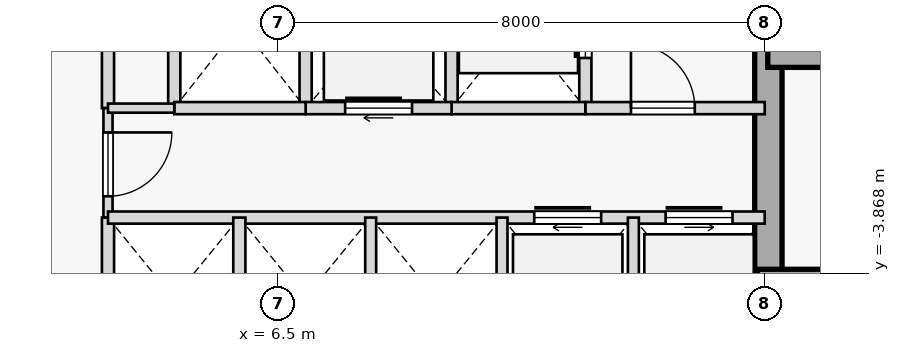
"""IFC4 building model, lengths in metres.
Left out: names, types, materials, properties, quantities, classifications, styles, units other than length and angle.
Written with IfcOpenShell. Run it as: python <this file> out.ifc"""

import sys

from ifc_helpers import new_model, si_unit, direction, frame, frame_2d, origin, origin_2d, place, context, subcontext, project, spatial, rectangle, extrude, element, fill, save


model = new_model("IFC4")
c1 = context("Model", 3, precision=1e-05, world=origin(), true_north=direction((0.0, 1.0)))
c2 = subcontext(c1, "Body", "Model", "MODEL_VIEW")
j1 = project(units=[si_unit("LENGTHUNIT", "METRE"), si_unit("PLANEANGLEUNIT", "RADIAN")], contexts=[c1])
p1 = place(None, origin())
s1 = spatial("IfcSite", under=j1, at=p1, CompositionType="ELEMENT")
p2 = place(p1, origin())
s2 = spatial("IfcBuilding", under=s1, at=p2, CompositionType="ELEMENT")
p3 = place(p2, frame((0.0, 0.0, 29.4)))
s3 = spatial("IfcBuildingStorey", under=s2, at=p3, CompositionType="ELEMENT", Elevation=29.4)
for number, where, z_axis, x_axis in (
    (1, (15.25, 0.22, 0.0), (0.0, 0.0, 1.0), (1.0, 0.0, 0.0)),
    (2, (15.08, -4.5, 0.0), (0.0, 0.0, 1.0), (1.0, 0.0, 0.0)),
):
    element("IfcColumn", number, at=place(p3, frame(where, z_axis=z_axis, x_axis=x_axis)), inside=s3, PredefinedType="COLUMN", context=c2, shape_type="SweptSolid", body=[
        extrude(rectangle(XDim=1.4, YDim=1.4, at=origin_2d()), origin(), (0.0, 0.0, 1.0), 3.8),
    ])
p4 = place(p3, frame((14.56, -5.375, 0.0), z_axis=(0.0, 0.0, 1.0), x_axis=(0.0, 1.0, 0.0)))
e3 = element("IfcWall", 3, at=p4, inside=s3, PredefinedType="SHEAR", context=c2, shape_type="SweptSolid", body=[
    extrude(rectangle(XDim=10.75, YDim=0.45, at=frame_2d((5.375, 0.0))), origin(), (0.0, 0.0, 1.0), 3.575),
])
p5 = place(p3, frame((3.7, -1.15, 0.0), z_axis=(0.0, 0.0, 1.0), x_axis=(0.0, 1.0, 0.0)))
e4 = element("IfcWall", 4, at=p5, inside=s3, PredefinedType="STANDARD", context=c2, shape_type="SweptSolid", body=[
    extrude(rectangle(XDim=6.75, YDim=0.2, at=frame_2d((3.375, 0.0))), origin(), (0.0, 0.0, 1.0), 3.575),
])
p6 = place(p5, frame((3.6, 0.0, 0.0)))
e5 = element("IfcOpeningElement", 5, at=p6, cuts=e4, PredefinedType="OPENING", context=c2, shape_type="SweptSolid", body=[
    extrude(rectangle(XDim=0.92, YDim=2.15, at=frame_2d((0.46, 1.075))), frame((0.0, 0.11, 0.0), z_axis=(0.0, -1.0, 0.0), x_axis=(1.0, 0.0, 0.0)), (0.0, 0.0, 1.0), 0.22),
])
p7 = place(p3, frame((3.7, -2.95, 0.0), z_axis=(0.0, 0.0, 1.0), x_axis=(0.0, 1.0, 0.0)))
e6 = element("IfcWall", 6, at=p7, inside=s3, PredefinedType="PARTITIONING", context=c2, shape_type="SweptSolid", body=[
    extrude(rectangle(XDim=1.8, YDim=0.15, at=frame_2d((0.9, 0.0))), origin(), (0.0, 0.0, 1.0), 3.575),
])
p8 = place(p7, frame((0.35, 0.0, 0.0)))
e7 = element("IfcOpeningElement", 7, at=p8, cuts=e6, PredefinedType="OPENING", context=c2, shape_type="SweptSolid", body=[
    extrude(rectangle(XDim=1.05, YDim=2.18, at=frame_2d((0.525, 1.09))), frame((0.0, 0.085, 0.0), z_axis=(0.0, -1.0, 0.0), x_axis=(1.0, 0.0, 0.0)), (0.0, 0.0, 1.0), 0.17),
])
p9 = place(p3, frame((3.7, -5.6, 0.0), z_axis=(0.0, 0.0, 1.0), x_axis=(0.0, 1.0, 0.0)))
e8 = element("IfcWall", 8, at=p9, inside=s3, PredefinedType="STANDARD", context=c2, shape_type="SweptSolid", body=[
    extrude(rectangle(XDim=2.65, YDim=0.2, at=frame_2d((1.325, 0.0))), origin(), (0.0, 0.0, 1.0), 3.575),
])
p10 = place(p3, frame((11.55, -1.15, 0.0), z_axis=(0.0, 0.0, 1.0), x_axis=(0.0, 1.0, 0.0)))
e9 = element("IfcWall", 9, at=p10, inside=s3, PredefinedType="STANDARD", context=c2, shape_type="SweptSolid", body=[
    extrude(rectangle(XDim=2.75, YDim=0.2, at=frame_2d((1.375, 0.0))), origin(), (0.0, 0.0, 1.0), 3.575),
])
p11 = place(p10, frame((0.825, 0.0, 0.0)))
e10 = element("IfcOpeningElement", 10, at=p11, cuts=e9, PredefinedType="OPENING", context=c2, shape_type="SweptSolid", body=[
    extrude(rectangle(XDim=1.1, YDim=2.15, at=frame_2d((0.55, 1.075))), frame((0.0, 0.11, 0.0), z_axis=(0.0, -1.0, 0.0), x_axis=(1.0, 0.0, 0.0)), (0.0, 0.0, 1.0), 0.22),
])
p12 = place(p3, frame((9.35, -1.15, 0.0), z_axis=(0.0, 0.0, 1.0), x_axis=(0.0, 1.0, 0.0)))
e11 = element("IfcWall", 11, at=p12, inside=s3, PredefinedType="STANDARD", context=c2, shape_type="SweptSolid", body=[
    extrude(rectangle(XDim=2.75, YDim=0.2, at=frame_2d((1.375, 0.0))), origin(), (0.0, 0.0, 1.0), 3.575),
])
p13 = place(p3, frame((11.55, -1.15, 0.0), z_axis=(0.0, 0.0, 1.0), x_axis=(1.0, 0.0, 0.0)))
e12 = element("IfcWall", 12, at=p13, inside=s3, PredefinedType="STANDARD", context=c2, shape_type="SweptSolid", body=[
    extrude(rectangle(XDim=2.95, YDim=0.2, at=frame_2d((1.475, 0.0))), origin(), (0.0, 0.0, 1.0), 3.575),
])
p14 = place(p13, frame((0.75, 0.0, 0.0)))
e13 = element("IfcOpeningElement", 13, at=p14, cuts=e12, PredefinedType="OPENING", context=c2, shape_type="SweptSolid", body=[
    extrude(rectangle(XDim=1.05, YDim=2.18, at=frame_2d((0.525, 1.09))), frame((0.0, 0.11, 0.0), z_axis=(0.0, -1.0, 0.0), x_axis=(1.0, 0.0, 0.0)), (0.0, 0.0, 1.0), 0.22),
])
p15 = place(p3, frame((9.35, -1.15, 0.0), z_axis=(0.0, 0.0, 1.0), x_axis=(1.0, 0.0, 0.0)))
e14 = element("IfcWall", 14, at=p15, inside=s3, PredefinedType="STANDARD", context=c2, shape_type="SweptSolid", body=[
    extrude(rectangle(XDim=2.2, YDim=0.2, at=frame_2d((1.1, 0.0))), origin(), (0.0, 0.0, 1.0), 3.575),
])
p16 = place(p3, frame((6.95, -1.15, 0.0), z_axis=(0.0, 0.0, 1.0), x_axis=(0.0, 1.0, 0.0)))
e15 = element("IfcWall", 15, at=p16, inside=s3, PredefinedType="STANDARD", context=c2, shape_type="SweptSolid", body=[
    extrude(rectangle(XDim=2.75, YDim=0.2, at=frame_2d((1.375, 0.0))), origin(), (0.0, 0.0, 1.0), 3.575),
])
p17 = place(p3, frame((6.95, -1.15, 0.0), z_axis=(0.0, 0.0, 1.0), x_axis=(1.0, 0.0, 0.0)))
e16 = element("IfcWall", 16, at=p17, inside=s3, PredefinedType="STANDARD", context=c2, shape_type="SweptSolid", body=[
    extrude(rectangle(XDim=2.4, YDim=0.2, at=frame_2d((1.2, 0.0))), origin(), (0.0, 0.0, 1.0), 3.575),
])
p18 = place(p17, frame((0.65, 0.0, 0.0)))
e17 = element("IfcOpeningElement", 17, at=p18, cuts=e16, PredefinedType="OPENING", context=c2, shape_type="SweptSolid", body=[
    extrude(rectangle(XDim=1.1, YDim=2.15, at=frame_2d((0.55, 1.075))), frame((0.0, 0.11, 0.0), z_axis=(0.0, -1.0, 0.0), x_axis=(1.0, 0.0, 0.0)), (0.0, 0.0, 1.0), 0.22),
])
p19 = place(p3, frame((4.79, -1.15, 0.0), z_axis=(0.0, 0.0, 1.0), x_axis=(0.0, 1.0, 0.0)))
e18 = element("IfcWall", 18, at=p19, inside=s3, PredefinedType="STANDARD", context=c2, shape_type="SweptSolid", body=[
    extrude(rectangle(XDim=2.75, YDim=0.2, at=frame_2d((1.375, 0.0))), origin(), (0.0, 0.0, 1.0), 3.575),
])
p20 = place(p3, frame((4.79, -1.15, 0.0), z_axis=(0.0, 0.0, 1.0), x_axis=(1.0, 0.0, 0.0)))
e19 = element("IfcWall", 19, at=p20, inside=s3, PredefinedType="STANDARD", context=c2, shape_type="SweptSolid", body=[
    extrude(rectangle(XDim=2.16, YDim=0.2, at=frame_2d((1.08, 0.0))), origin(), (0.0, 0.0, 1.0), 3.575),
])
p21 = place(p3, frame((3.7, -1.15, 0.0), z_axis=(0.0, 0.0, 1.0), x_axis=(1.0, 0.0, 0.0)))
e20 = element("IfcWall", 20, at=p21, inside=s3, PredefinedType="PARTITIONING", context=c2, shape_type="SweptSolid", body=[
    extrude(rectangle(XDim=1.09, YDim=0.15, at=frame_2d((0.545, 0.0))), origin(), (0.0, 0.0, 1.0), 3.575),
])
p22 = place(p3, frame((3.7, -2.95, 0.0), z_axis=(0.0, 0.0, 1.0), x_axis=(1.0, 0.0, 0.0)))
e21 = element("IfcWall", 21, at=p22, inside=s3, PredefinedType="STANDARD", context=c2, shape_type="SweptSolid", body=[
    extrude(rectangle(XDim=10.8, YDim=0.2, at=frame_2d((5.4, 0.0))), origin(), (0.0, 0.0, 1.0), 3.575),
])
p23 = place(p22, frame((7.01, 0.0, 0.0)))
e22 = element("IfcOpeningElement", 22, at=p23, cuts=e21, PredefinedType="OPENING", context=c2, shape_type="SweptSolid", body=[
    extrude(rectangle(XDim=1.1, YDim=2.15, at=frame_2d((0.55, 1.075))), frame((0.0, 0.11, 0.0), z_axis=(0.0, -1.0, 0.0), x_axis=(1.0, 0.0, 0.0)), (0.0, 0.0, 1.0), 0.22),
])
p24 = place(p22, frame((9.17, 0.0, 0.0)))
e23 = element("IfcOpeningElement", 23, at=p24, cuts=e21, PredefinedType="OPENING", context=c2, shape_type="SweptSolid", body=[
    extrude(rectangle(XDim=1.1, YDim=2.15, at=frame_2d((0.55, 1.075))), frame((0.0, 0.11, 0.0), z_axis=(0.0, -1.0, 0.0), x_axis=(1.0, 0.0, 0.0)), (0.0, 0.0, 1.0), 0.22),
])
p25 = place(p3, frame((5.86, -5.6, 0.0), z_axis=(0.0, 0.0, 1.0), x_axis=(0.0, 1.0, 0.0)))
e24 = element("IfcWall", 24, at=p25, inside=s3, PredefinedType="STANDARD", context=c2, shape_type="SweptSolid", body=[
    extrude(rectangle(XDim=2.65, YDim=0.2, at=frame_2d((1.325, 0.0))), origin(), (0.0, 0.0, 1.0), 3.575),
])
for number, where, z_axis, x_axis in (
    (25, (12.34, -5.6, 0.0), (0.0, 0.0, 1.0), (0.0, 1.0, 0.0)),
    (26, (10.18, -5.6, 0.0), (0.0, 0.0, 1.0), (0.0, 1.0, 0.0)),
    (27, (8.02, -5.6, 0.0), (0.0, 0.0, 1.0), (0.0, 1.0, 0.0)),
):
    element("IfcWall", number, at=place(p3, frame(where, z_axis=z_axis, x_axis=x_axis)), inside=s3, PredefinedType="STANDARD", context=c2, shape_type="SweptSolid", body=[
        extrude(rectangle(XDim=2.65, YDim=0.18, at=frame_2d((1.325, 0.0))), origin(), (0.0, 0.0, 1.0), 3.575),
    ])
p26 = place(p14, origin())
e28 = element("IfcDoor", 28, at=p26, inside=s3, OperationType="SINGLE_SWING_LEFT", PredefinedType="DOOR", context=c2, shape_type="SweptSolid", body=[
    extrude(rectangle(XDim=1.05, YDim=2.18, at=frame_2d((0.525, 1.09))), frame((0.0, 0.025, 0.0), z_axis=(0.0, -1.0, 0.0), x_axis=(1.0, 0.0, 0.0)), (0.0, 0.0, 1.0), 0.05),
])
fill(e13, e28)
p27 = place(p8, frame((1.05, 0.0, 0.0), z_axis=(0.0, 0.0, 1.0), x_axis=(-1.0, 0.0, 0.0)))
e29 = element("IfcDoor", 29, at=p27, inside=s3, OperationType="SINGLE_SWING_RIGHT", PredefinedType="DOOR", context=c2, shape_type="SweptSolid", body=[
    extrude(rectangle(XDim=1.05, YDim=2.18, at=frame_2d((0.525, 1.09))), frame((0.0, 0.025, 0.0), z_axis=(0.0, -1.0, 0.0), x_axis=(1.0, 0.0, 0.0)), (0.0, 0.0, 1.0), 0.05),
])
fill(e7, e29)
p28 = place(p11, origin())
e30 = element("IfcDoor", 30, at=p28, inside=s3, OperationType="SLIDING_TO_RIGHT", PredefinedType="DOOR", context=c2, shape_type="SweptSolid", body=[
    extrude(rectangle(XDim=1.1, YDim=2.15, at=frame_2d((0.55, 1.075))), frame((0.0, 0.025, 0.0), z_axis=(0.0, -1.0, 0.0), x_axis=(1.0, 0.0, 0.0)), (0.0, 0.0, 1.0), 0.05),
])
fill(e10, e30)
p29 = place(p18, origin())
e31 = element("IfcDoor", 31, at=p29, inside=s3, OperationType="SLIDING_TO_RIGHT", PredefinedType="DOOR", context=c2, shape_type="SweptSolid", body=[
    extrude(rectangle(XDim=1.1, YDim=2.15, at=frame_2d((0.55, 1.075))), frame((0.0, 0.025, 0.0), z_axis=(0.0, -1.0, 0.0), x_axis=(1.0, 0.0, 0.0)), (0.0, 0.0, 1.0), 0.05),
])
fill(e17, e31)
p30 = place(p23, origin())
e32 = element("IfcDoor", 32, at=p30, inside=s3, OperationType="SLIDING_TO_RIGHT", PredefinedType="DOOR", context=c2, shape_type="SweptSolid", body=[
    extrude(rectangle(XDim=1.1, YDim=2.15, at=frame_2d((0.55, 1.075))), frame((0.0, 0.025, 0.0), z_axis=(0.0, -1.0, 0.0), x_axis=(1.0, 0.0, 0.0)), (0.0, 0.0, 1.0), 0.05),
])
fill(e22, e32)
p31 = place(p24, origin())
e33 = element("IfcDoor", 33, at=p31, inside=s3, OperationType="SLIDING_TO_LEFT", PredefinedType="DOOR", context=c2, shape_type="SweptSolid", body=[
    extrude(rectangle(XDim=1.1, YDim=2.15, at=frame_2d((0.55, 1.075))), frame((0.0, 0.025, 0.0), z_axis=(0.0, -1.0, 0.0), x_axis=(1.0, 0.0, 0.0)), (0.0, 0.0, 1.0), 0.05),
])
fill(e23, e33)
save(model, sys.argv[1])
